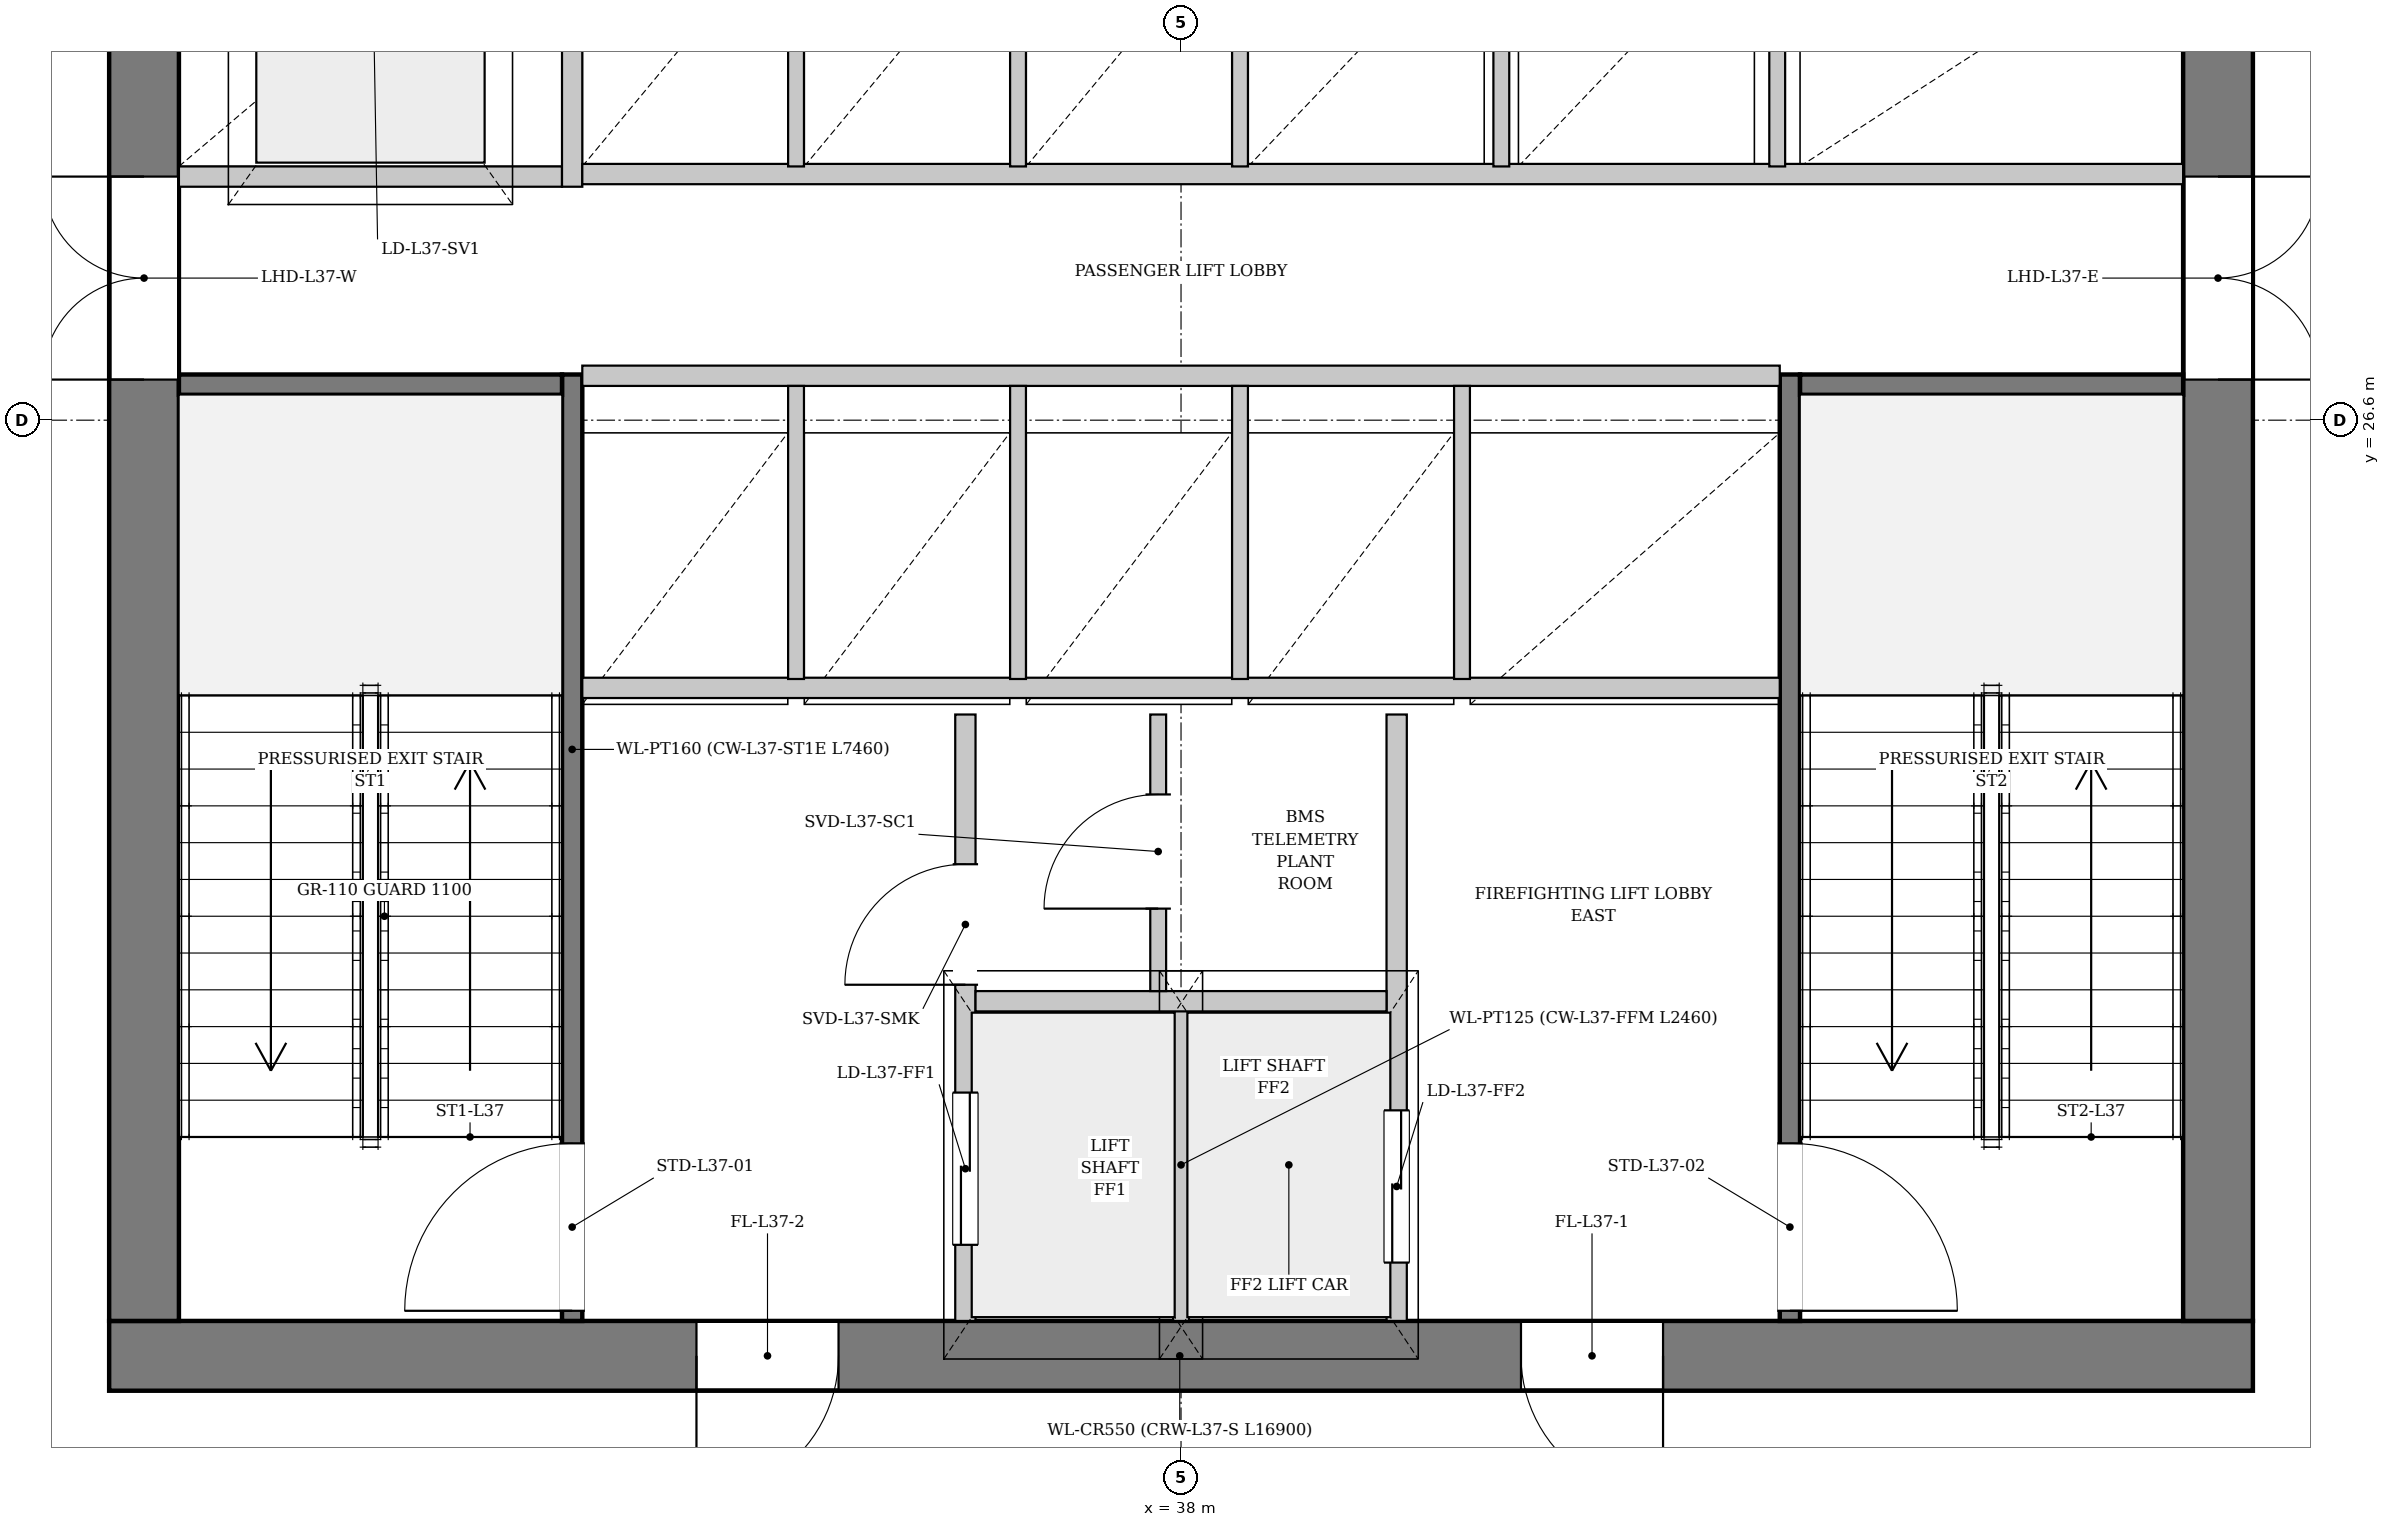
"""IFC4 building model, lengths in metres.
Left out: names, types, materials, properties, quantities, classifications, styles, units other than length and angle.
Written with IfcOpenShell. Run it as: python <this file> out.ifc"""

import sys

from ifc_helpers import new_model, si_unit, direction, frame, frame_2d, origin, place, context, subcontext, project, spatial, rectangle, extrude, source, transform, mapped, element, fill, save


model = new_model("IFC4")
c1 = context("Model", 3, precision=1e-05, world=origin(), true_north=direction((0.0, 1.0)))
c2 = subcontext(c1, "Body", "Model", "MODEL_VIEW")
j1 = project(units=[si_unit("LENGTHUNIT", "METRE"), si_unit("PLANEANGLEUNIT", "RADIAN")], contexts=[c1])
p1 = place(None, origin())
s1 = spatial("IfcSite", under=j1, at=p1, CompositionType="ELEMENT")
p2 = place(p1, origin())
s2 = spatial("IfcBuilding", under=s1, at=p2, CompositionType="ELEMENT")
p3 = place(p2, frame((0.0, 0.0, 142.1)))
s3 = spatial("IfcBuildingStorey", under=s2, at=p3, CompositionType="ELEMENT", Elevation=142.1)
p4 = place(p3, frame((46.45, 19.225, 0.0), z_axis=(0.0, 0.0, 1.0), x_axis=(-1.0, 0.0, 0.0)))
e1 = element("IfcWall", 1, at=p4, inside=s3, PredefinedType="SHEAR", context=c2, shape_type="SweptSolid", body=[
    extrude(rectangle(XDim=16.9, YDim=0.55, at=frame_2d((8.45, 0.0))), origin(), (0.0, 0.0, 1.0), 4.25),
])
p5 = place(p4, frame((4.65, 0.0, 0.0)))
e2 = element("IfcOpeningElement", 2, at=p5, cuts=e1, PredefinedType="OPENING", context=c2, shape_type="SweptSolid", body=[
    extrude(rectangle(XDim=1.12, YDim=2.25, at=frame_2d((0.56, 1.125))), frame((0.0, 0.285, 0.0), z_axis=(0.0, -1.0, 0.0), x_axis=(1.0, 0.0, 0.0)), (0.0, 0.0, 1.0), 0.57),
])
p6 = place(p4, frame((11.15, 0.0, 0.0)))
e3 = element("IfcOpeningElement", 3, at=p6, cuts=e1, PredefinedType="OPENING", context=c2, shape_type="SweptSolid", body=[
    extrude(rectangle(XDim=1.12, YDim=2.25, at=frame_2d((0.56, 1.125))), frame((0.0, 0.285, 0.0), z_axis=(0.0, -1.0, 0.0), x_axis=(1.0, 0.0, 0.0)), (0.0, 0.0, 1.0), 0.57),
])
p7 = place(p3, frame((29.825, 19.5, 0.0), z_axis=(0.0, 0.0, 1.0), x_axis=(0.0, 1.0, 0.0)))
e4 = element("IfcWall", 4, at=p7, inside=s3, PredefinedType="SHEAR", context=c2, shape_type="SweptSolid", body=[
    extrude(rectangle(XDim=14.2, YDim=0.55, at=frame_2d((7.1, 0.0))), origin(), (0.0, 0.0, 1.0), 4.25),
])
p8 = place(p7, frame((7.42, 0.0, 0.0)))
e5 = element("IfcOpeningElement", 5, at=p8, cuts=e4, PredefinedType="OPENING", context=c2, shape_type="SweptSolid", body=[
    extrude(rectangle(XDim=1.6, YDim=2.2, at=frame_2d((0.8, 1.1))), frame((0.0, 0.285, 0.0), z_axis=(0.0, -1.0, 0.0), x_axis=(1.0, 0.0, 0.0)), (0.0, 0.0, 1.0), 0.57),
])
p9 = place(p3, frame((46.175, 33.7, 0.0), z_axis=(0.0, 0.0, 1.0), x_axis=(0.0, -1.0, 0.0)))
e6 = element("IfcWall", 6, at=p9, inside=s3, PredefinedType="SHEAR", context=c2, shape_type="SweptSolid", body=[
    extrude(rectangle(XDim=14.2, YDim=0.55, at=frame_2d((7.1, 0.0))), origin(), (0.0, 0.0, 1.0), 4.25),
])
p10 = place(p9, frame((5.18, 0.0, 0.0)))
e7 = element("IfcOpeningElement", 7, at=p10, cuts=e6, PredefinedType="OPENING", context=c2, shape_type="SweptSolid", body=[
    extrude(rectangle(XDim=1.6, YDim=2.2, at=frame_2d((0.8, 1.1))), frame((0.0, 0.285, 0.0), z_axis=(0.0, -1.0, 0.0), x_axis=(1.0, 0.0, 0.0)), (0.0, 0.0, 1.0), 0.57),
])
p11 = place(p3, frame((33.2, 19.5, 0.0), z_axis=(0.0, 0.0, 1.0), x_axis=(0.0, 1.0, 0.0)))
e8 = element("IfcWall", 8, at=p11, inside=s3, PredefinedType="PARTITIONING", context=c2, shape_type="SweptSolid", body=[
    extrude(rectangle(XDim=7.46, YDim=0.16, at=frame_2d((3.73, 0.0))), origin(), (0.0, 0.0, 1.0), 4.25),
])
p12 = place(p11, frame((0.08, 0.0, 0.0)))
e9 = element("IfcOpeningElement", 9, at=p12, cuts=e8, PredefinedType="OPENING", context=c2, shape_type="SweptSolid", body=[
    extrude(rectangle(XDim=1.32, YDim=2.2, at=frame_2d((0.66, 1.1))), frame((0.0, 0.09, 0.0), z_axis=(0.0, -1.0, 0.0), x_axis=(1.0, 0.0, 0.0)), (0.0, 0.0, 1.0), 0.18),
])
p13 = place(p3, frame((30.1, 26.88, 0.0), z_axis=(0.0, 0.0, 1.0), x_axis=(1.0, 0.0, 0.0)))
e10 = element("IfcWall", 10, at=p13, inside=s3, PredefinedType="PARTITIONING", context=c2, shape_type="SweptSolid", body=[
    extrude(rectangle(XDim=3.02, YDim=0.16, at=frame_2d((1.51, 0.0))), origin(), (0.0, 0.0, 1.0), 4.25),
])
p14 = place(p3, frame((42.8, 26.96, 0.0), z_axis=(0.0, 0.0, 1.0), x_axis=(0.0, -1.0, 0.0)))
e11 = element("IfcWall", 11, at=p14, inside=s3, PredefinedType="PARTITIONING", context=c2, shape_type="SweptSolid", body=[
    extrude(rectangle(XDim=7.46, YDim=0.16, at=frame_2d((3.73, 0.0))), origin(), (0.0, 0.0, 1.0), 4.25),
])
p15 = place(p14, frame((6.06, 0.0, 0.0)))
e12 = element("IfcOpeningElement", 12, at=p15, cuts=e11, PredefinedType="OPENING", context=c2, shape_type="SweptSolid", body=[
    extrude(rectangle(XDim=1.32, YDim=2.2, at=frame_2d((0.66, 1.1))), frame((0.0, 0.09, 0.0), z_axis=(0.0, -1.0, 0.0), x_axis=(1.0, 0.0, 0.0)), (0.0, 0.0, 1.0), 0.18),
])
p16 = place(p3, frame((42.88, 26.88, 0.0), z_axis=(0.0, 0.0, 1.0), x_axis=(1.0, 0.0, 0.0)))
e13 = element("IfcWall", 13, at=p16, inside=s3, PredefinedType="PARTITIONING", context=c2, shape_type="SweptSolid", body=[
    extrude(rectangle(XDim=3.02, YDim=0.16, at=frame_2d((1.51, 0.0))), origin(), (0.0, 0.0, 1.0), 4.25),
])
p17 = place(p3, frame((36.3, 19.5, 0.0), z_axis=(0.0, 0.0, 1.0), x_axis=(0.0, 1.0, 0.0)))
e14 = element("IfcWall", 14, at=p17, inside=s3, PredefinedType="PARTITIONING", context=c2, shape_type="SweptSolid", body=[
    extrude(rectangle(XDim=4.78, YDim=0.16, at=frame_2d((2.39, 0.0))), origin(), (0.0, 0.0, 1.0), 4.25),
])
p18 = place(p17, frame((0.6, 0.0, 0.0)))
e15 = element("IfcOpeningElement", 15, at=p18, cuts=e14, PredefinedType="OPENING", context=c2, shape_type="SweptSolid", body=[
    extrude(rectangle(XDim=1.2, YDim=2.2, at=frame_2d((0.6, 1.1))), frame((0.0, 0.09, 0.0), z_axis=(0.0, -1.0, 0.0), x_axis=(1.0, 0.0, 0.0)), (0.0, 0.0, 1.0), 0.18),
])
p19 = place(p17, frame((2.65, 0.0, 0.0)))
e16 = element("IfcOpeningElement", 16, at=p19, cuts=e14, PredefinedType="OPENING", context=c2, shape_type="SweptSolid", body=[
    extrude(rectangle(XDim=0.95, YDim=2.1, at=frame_2d((0.475, 1.05))), frame((0.0, 0.09, 0.0), z_axis=(0.0, -1.0, 0.0), x_axis=(1.0, 0.0, 0.0)), (0.0, 0.0, 1.0), 0.18),
])
p20 = place(p3, frame((39.7, 24.28, 0.0), z_axis=(0.0, 0.0, 1.0), x_axis=(0.0, -1.0, 0.0)))
e17 = element("IfcWall", 17, at=p20, inside=s3, PredefinedType="PARTITIONING", context=c2, shape_type="SweptSolid", body=[
    extrude(rectangle(XDim=4.78, YDim=0.16, at=frame_2d((2.39, 0.0))), origin(), (0.0, 0.0, 1.0), 4.25),
])
p21 = place(p20, frame((3.12, 0.0, 0.0)))
e18 = element("IfcOpeningElement", 18, at=p21, cuts=e17, PredefinedType="OPENING", context=c2, shape_type="SweptSolid", body=[
    extrude(rectangle(XDim=1.2, YDim=2.2, at=frame_2d((0.6, 1.1))), frame((0.0, 0.09, 0.0), z_axis=(0.0, -1.0, 0.0), x_axis=(1.0, 0.0, 0.0)), (0.0, 0.0, 1.0), 0.18),
])
p22 = place(p3, frame((38.0, 19.5, 0.0), z_axis=(0.0, 0.0, 1.0), x_axis=(0.0, 1.0, 0.0)))
e19 = element("IfcWall", 19, at=p22, inside=s3, PredefinedType="PARTITIONING", context=c2, shape_type="SweptSolid", body=[
    extrude(rectangle(XDim=2.46, YDim=0.125, at=frame_2d((1.23, 0.0))), origin(), (0.0, 0.0, 1.0), 4.25),
])
p23 = place(p3, frame((36.38, 22.02, 0.0), z_axis=(0.0, 0.0, 1.0), x_axis=(1.0, 0.0, 0.0)))
e20 = element("IfcWall", 20, at=p23, inside=s3, PredefinedType="PARTITIONING", context=c2, shape_type="SweptSolid", body=[
    extrude(rectangle(XDim=3.24, YDim=0.16, at=frame_2d((1.62, 0.0))), origin(), (0.0, 0.0, 1.0), 4.25),
])
p24 = place(p3, frame((33.28, 24.49, 0.0), z_axis=(0.0, 0.0, 1.0), x_axis=(1.0, 0.0, 0.0)))
e21 = element("IfcWall", 21, at=p24, inside=s3, PredefinedType="PARTITIONING", context=c2, shape_type="SweptSolid", body=[
    extrude(rectangle(XDim=9.44, YDim=0.16, at=frame_2d((4.72, 0.0))), origin(), (0.0, 0.0, 1.0), 4.25),
])
p25 = place(p3, frame((37.82, 22.1, 0.0), z_axis=(0.0, 0.0, 1.0), x_axis=(0.0, 1.0, 0.0)))
e22 = element("IfcWall", 22, at=p25, inside=s3, PredefinedType="PARTITIONING", context=c2, shape_type="SweptSolid", body=[
    extrude(rectangle(XDim=2.18, YDim=0.125, at=frame_2d((1.09, 0.0))), origin(), (0.0, 0.0, 1.0), 4.25),
])
p26 = place(p25, frame((0.65, 0.0, 0.0)))
e23 = element("IfcOpeningElement", 23, at=p26, cuts=e22, PredefinedType="OPENING", context=c2, shape_type="SweptSolid", body=[
    extrude(rectangle(XDim=0.9, YDim=2.1, at=frame_2d((0.45, 1.05))), frame((0.0, 0.073, 0.0), z_axis=(0.0, -1.0, 0.0), x_axis=(1.0, 0.0, 0.0)), (0.0, 0.0, 1.0), 0.145),
])
p27 = place(p3, frame((30.1, 28.52, 0.0), z_axis=(0.0, 0.0, 1.0), x_axis=(1.0, 0.0, 0.0)))
e24 = element("IfcWall", 24, at=p27, inside=s3, PredefinedType="PARTITIONING", context=c2, shape_type="SweptSolid", body=[
    extrude(rectangle(XDim=3.02, YDim=0.16, at=frame_2d((1.51, 0.0))), origin(), (0.0, 0.0, 1.0), 4.25),
])
p28 = place(p3, frame((33.2, 28.44, 0.0), z_axis=(0.0, 0.0, 1.0), x_axis=(0.0, 1.0, 0.0)))
e25 = element("IfcWall", 25, at=p28, inside=s3, PredefinedType="PARTITIONING", context=c2, shape_type="SweptSolid", body=[
    extrude(rectangle(XDim=5.26, YDim=0.16, at=frame_2d((2.63, 0.0))), origin(), (0.0, 0.0, 1.0), 4.25),
])
p29 = place(p3, frame((33.28, 26.95, 0.0), z_axis=(0.0, 0.0, 1.0), x_axis=(1.0, 0.0, 0.0)))
e26 = element("IfcWall", 26, at=p29, inside=s3, PredefinedType="PARTITIONING", context=c2, shape_type="SweptSolid", body=[
    extrude(rectangle(XDim=9.44, YDim=0.16, at=frame_2d((4.72, 0.0))), origin(), (0.0, 0.0, 1.0), 4.25),
])
for number, where, z_axis, x_axis in (
    (27, (34.965, 24.56, 0.0), (0.0, 0.0, 1.0), (0.0, 1.0, 0.0)),
    (28, (36.715, 24.56, 0.0), (0.0, 0.0, 1.0), (0.0, 1.0, 0.0)),
    (29, (38.465, 24.56, 0.0), (0.0, 0.0, 1.0), (0.0, 1.0, 0.0)),
    (30, (40.215, 24.56, 0.0), (0.0, 0.0, 1.0), (0.0, 1.0, 0.0)),
):
    element("IfcWall", number, at=place(p3, frame(where, z_axis=z_axis, x_axis=x_axis)), inside=s3, PredefinedType="PARTITIONING", context=c2, shape_type="SweptSolid", body=[
        extrude(rectangle(XDim=2.31, YDim=0.125, at=frame_2d((1.155, 0.0))), origin(), (0.0, 0.0, 1.0), 4.25),
    ])
p30 = place(p3, frame((33.28, 28.54, 0.0), z_axis=(0.0, 0.0, 1.0), x_axis=(1.0, 0.0, 0.0)))
e31 = element("IfcWall", 31, at=p30, inside=s3, PredefinedType="PARTITIONING", context=c2, shape_type="SweptSolid", body=[
    extrude(rectangle(XDim=12.62, YDim=0.16, at=frame_2d((6.31, 0.0))), origin(), (0.0, 0.0, 1.0), 4.25),
])
for number, where, z_axis, x_axis in (
    (32, (34.965, 28.6, 0.0), (0.0, 0.0, 1.0), (0.0, 1.0, 0.0)),
    (33, (36.715, 28.6, 0.0), (0.0, 0.0, 1.0), (0.0, 1.0, 0.0)),
    (34, (38.465, 28.6, 0.0), (0.0, 0.0, 1.0), (0.0, 1.0, 0.0)),
    (35, (40.525, 28.6, 0.0), (0.0, 0.0, 1.0), (0.0, 1.0, 0.0)),
    (36, (42.7, 28.6, 0.0), (0.0, 0.0, 1.0), (0.0, 1.0, 0.0)),
):
    element("IfcWall", number, at=place(p3, frame(where, z_axis=z_axis, x_axis=x_axis)), inside=s3, PredefinedType="PARTITIONING", context=c2, shape_type="SweptSolid", body=[
        extrude(rectangle(XDim=1.92, YDim=0.125, at=frame_2d((0.96, 0.0))), origin(), (0.0, 0.0, 1.0), 4.25),
    ])
m1 = source(origin(), c2, "Body", "SweptSolid", [
    extrude(rectangle(XDim=1.12, YDim=2.25, at=frame_2d((0.56, 1.125))), frame((0.0, 0.025, 0.0), z_axis=(0.0, -1.0, 0.0), x_axis=(1.0, 0.0, 0.0)), (0.0, 0.0, 1.0), 0.05),
])
p31 = place(p5, origin())
e37 = element("IfcDoor", 37, at=p31, inside=s3, OperationType="SINGLE_SWING_LEFT", PredefinedType="DOOR", context=c2, shape_type="MappedRepresentation", body=[
    mapped(m1, transform((0.0, 0.0, 0.0), x_axis=(1.0, 0.0, 0.0), y_axis=(0.0, 1.0, 0.0), z_axis=(0.0, 0.0, 1.0), scale=1.0)),
])
fill(e2, e37)
p32 = place(p6, origin())
e38 = element("IfcDoor", 38, at=p32, inside=s3, OperationType="SINGLE_SWING_RIGHT", PredefinedType="DOOR", context=c2, shape_type="MappedRepresentation", body=[
    mapped(m1, transform((0.0, 0.0, 0.0), x_axis=(1.0, 0.0, 0.0), y_axis=(0.0, 1.0, 0.0), z_axis=(0.0, 0.0, 1.0), scale=1.0)),
])
fill(e3, e38)
m2 = source(origin(), c2, "Body", "SweptSolid", [
    extrude(rectangle(XDim=1.6, YDim=2.2, at=frame_2d((0.8, 1.1))), frame((0.0, 0.025, 0.0), z_axis=(0.0, -1.0, 0.0), x_axis=(1.0, 0.0, 0.0)), (0.0, 0.0, 1.0), 0.05),
])
p33 = place(p8, origin())
e39 = element("IfcDoor", 39, at=p33, inside=s3, OperationType="DOUBLE_DOOR_SINGLE_SWING", PredefinedType="DOOR", context=c2, shape_type="MappedRepresentation", body=[
    mapped(m2, transform((0.0, 0.0, 0.0), x_axis=(1.0, 0.0, 0.0), y_axis=(0.0, 1.0, 0.0), z_axis=(0.0, 0.0, 1.0), scale=1.0)),
])
fill(e5, e39)
p34 = place(p10, origin())
e40 = element("IfcDoor", 40, at=p34, inside=s3, OperationType="DOUBLE_DOOR_SINGLE_SWING", PredefinedType="DOOR", context=c2, shape_type="MappedRepresentation", body=[
    mapped(m2, transform((0.0, 0.0, 0.0), x_axis=(1.0, 0.0, 0.0), y_axis=(0.0, 1.0, 0.0), z_axis=(0.0, 0.0, 1.0), scale=1.0)),
])
fill(e7, e40)
m3 = source(origin(), c2, "Body", "SweptSolid", [
    extrude(rectangle(XDim=1.32, YDim=2.2, at=frame_2d((0.66, 1.1))), frame((0.0, 0.025, 0.0), z_axis=(0.0, -1.0, 0.0), x_axis=(1.0, 0.0, 0.0)), (0.0, 0.0, 1.0), 0.05),
])
p35 = place(p12, origin())
e41 = element("IfcDoor", 41, at=p35, inside=s3, OperationType="SINGLE_SWING_LEFT", PredefinedType="DOOR", context=c2, shape_type="MappedRepresentation", body=[
    mapped(m3, transform((0.0, 0.0, 0.0), x_axis=(1.0, 0.0, 0.0), y_axis=(0.0, 1.0, 0.0), z_axis=(0.0, 0.0, 1.0), scale=1.0)),
])
fill(e9, e41)
p36 = place(p15, origin())
e42 = element("IfcDoor", 42, at=p36, inside=s3, OperationType="SINGLE_SWING_RIGHT", PredefinedType="DOOR", context=c2, shape_type="MappedRepresentation", body=[
    mapped(m3, transform((0.0, 0.0, 0.0), x_axis=(1.0, 0.0, 0.0), y_axis=(0.0, 1.0, 0.0), z_axis=(0.0, 0.0, 1.0), scale=1.0)),
])
fill(e12, e42)
m4 = source(origin(), c2, "Body", "SweptSolid", [
    extrude(rectangle(XDim=1.2, YDim=2.2, at=frame_2d((0.6, 1.1))), frame((0.0, 0.025, 0.0), z_axis=(0.0, -1.0, 0.0), x_axis=(1.0, 0.0, 0.0)), (0.0, 0.0, 1.0), 0.05),
])
p37 = place(p18, origin())
e43 = element("IfcDoor", 43, at=p37, inside=s3, OperationType="DOUBLE_DOOR_SLIDING", PredefinedType="DOOR", context=c2, shape_type="MappedRepresentation", body=[
    mapped(m4, transform((0.0, 0.0, 0.0), x_axis=(1.0, 0.0, 0.0), y_axis=(0.0, 1.0, 0.0), z_axis=(0.0, 0.0, 1.0), scale=1.0)),
])
fill(e15, e43)
m5 = source(origin(), c2, "Body", "SweptSolid", [
    extrude(rectangle(XDim=0.95, YDim=2.1, at=frame_2d((0.475, 1.05))), frame((0.0, 0.025, 0.0), z_axis=(0.0, -1.0, 0.0), x_axis=(1.0, 0.0, 0.0)), (0.0, 0.0, 1.0), 0.05),
])
p38 = place(p19, origin())
e44 = element("IfcDoor", 44, at=p38, inside=s3, OperationType="SINGLE_SWING_LEFT", PredefinedType="DOOR", context=c2, shape_type="MappedRepresentation", body=[
    mapped(m5, transform((0.0, 0.0, 0.0), x_axis=(1.0, 0.0, 0.0), y_axis=(0.0, 1.0, 0.0), z_axis=(0.0, 0.0, 1.0), scale=1.0)),
])
fill(e16, e44)
m6 = source(origin(), c2, "Body", "SweptSolid", [
    extrude(rectangle(XDim=0.9, YDim=2.1, at=frame_2d((0.45, 1.05))), frame((0.0, 0.025, 0.0), z_axis=(0.0, -1.0, 0.0), x_axis=(1.0, 0.0, 0.0)), (0.0, 0.0, 1.0), 0.05),
])
p39 = place(p26, origin())
e45 = element("IfcDoor", 45, at=p39, inside=s3, OperationType="SINGLE_SWING_LEFT", PredefinedType="DOOR", context=c2, shape_type="MappedRepresentation", body=[
    mapped(m6, transform((0.0, 0.0, 0.0), x_axis=(1.0, 0.0, 0.0), y_axis=(0.0, 1.0, 0.0), z_axis=(0.0, 0.0, 1.0), scale=1.0)),
])
fill(e23, e45)
p40 = place(p21, origin())
e46 = element("IfcDoor", 46, at=p40, inside=s3, OperationType="DOUBLE_DOOR_SLIDING", PredefinedType="DOOR", context=c2, shape_type="MappedRepresentation", body=[
    mapped(m4, transform((0.0, 0.0, 0.0), x_axis=(1.0, 0.0, 0.0), y_axis=(0.0, 1.0, 0.0), z_axis=(0.0, 0.0, 1.0), scale=1.0)),
])
fill(e18, e46)
save(model, sys.argv[1])
